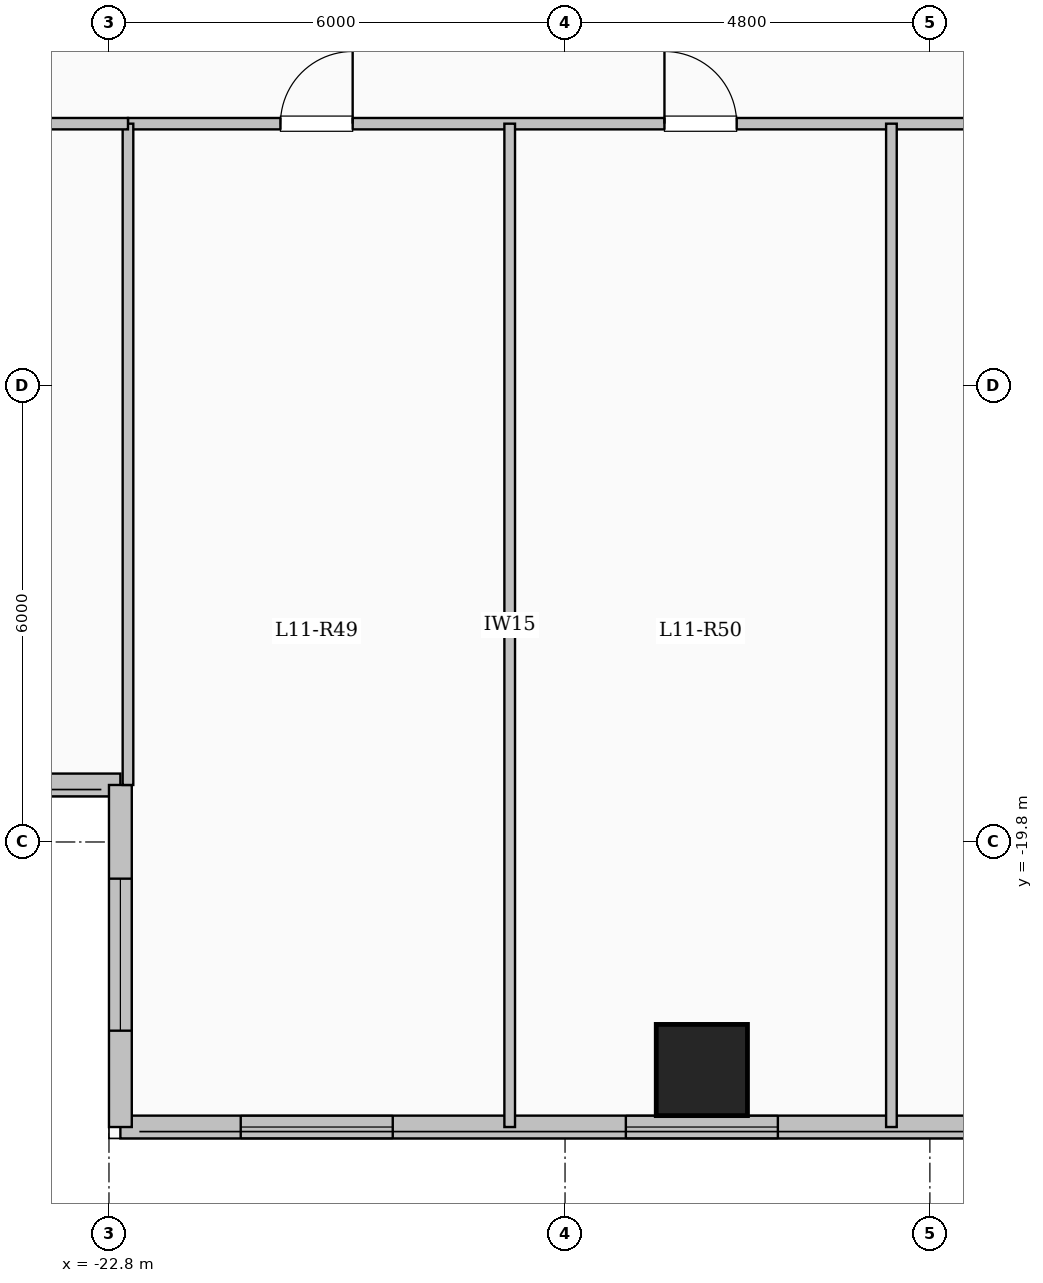
"""IFC4 building model, lengths in metres.
Left out: names, types, materials, properties, quantities, classifications, styles, units other than length and angle.
Written with IfcOpenShell. Run it as: python <this file> out.ifc"""

import sys

from ifc_helpers import new_model, si_unit, direction, frame, frame_2d, origin, origin_2d, place, context, subcontext, project, spatial, rectangle, extrude, element, fill, save


model = new_model("IFC4")
c1 = context("Model", 3, precision=1e-05, world=origin(), true_north=direction((0.0, 1.0)))
c2 = subcontext(c1, "Body", "Model", "MODEL_VIEW")
j1 = project(units=[si_unit("LENGTHUNIT", "METRE"), si_unit("PLANEANGLEUNIT", "RADIAN")], contexts=[c1])
p1 = place(None, origin())
s1 = spatial("IfcSite", under=j1, at=p1, CompositionType="ELEMENT")
p2 = place(p1, origin())
s2 = spatial("IfcBuilding", under=s1, at=p2, CompositionType="ELEMENT")
p3 = place(p2, frame((0.0, 0.0, 44.1)))
s3 = spatial("IfcBuildingStorey", under=s2, at=p3, CompositionType="ELEMENT", Elevation=44.1)
p4 = place(p3, frame((-15.0, -22.8, 0.0), z_axis=(0.0, 0.0, 1.0), x_axis=(1.0, 0.0, 0.0)))
e1 = element("IfcColumn", 1, at=p4, inside=s3, PredefinedType="COLUMN", context=c2, shape_type="SweptSolid", body=[
    extrude(rectangle(XDim=1.2, YDim=1.2, at=origin_2d()), origin(), (0.0, 0.0, 1.0), 3.35),
])
p5 = place(p3, frame((-22.65, -19.05, 0.0), z_axis=(0.0, 0.0, 1.0), x_axis=(-1.0, 0.0, 0.0)))
e2 = element("IfcWall", 2, at=p5, inside=s3, PredefinedType="SOLIDWALL", context=c2, shape_type="SweptSolid", body=[
    extrude(rectangle(XDim=6.0, YDim=0.3, at=frame_2d((3.0, 0.0))), origin(), (0.0, 0.0, 1.0), 3.1),
])
p6 = place(p5, frame((1.775, 0.0, 0.9)))
e3 = element("IfcOpeningElement", 3, at=p6, cuts=e2, PredefinedType="OPENING", context=c2, shape_type="SweptSolid", body=[
    extrude(rectangle(XDim=2.4, YDim=1.8, at=frame_2d((1.2, 0.9))), frame((0.0, 0.16, 0.0), z_axis=(0.0, -1.0, 0.0), x_axis=(1.0, 0.0, 0.0)), (0.0, 0.0, 1.0), 0.32),
])
p7 = place(p3, frame((-7.35, -23.55, 0.0), z_axis=(0.0, 0.0, 1.0), x_axis=(-1.0, 0.0, 0.0)))
e4 = element("IfcWall", 4, at=p7, inside=s3, PredefinedType="SOLIDWALL", context=c2, shape_type="SweptSolid", body=[
    extrude(rectangle(XDim=15.3, YDim=0.3, at=frame_2d((7.65, 0.0))), origin(), (0.0, 0.0, 1.0), 3.1),
])
p8 = place(p7, frame((0.147, 0.0, 0.95)))
e5 = element("IfcOpeningElement", 5, at=p8, cuts=e4, PredefinedType="OPENING", context=c2, shape_type="SweptSolid", body=[
    extrude(rectangle(XDim=0.85, YDim=1.5, at=frame_2d((0.425, 0.75))), frame((0.0, 0.16, 0.0), z_axis=(0.0, -1.0, 0.0), x_axis=(1.0, 0.0, 0.0)), (0.0, 0.0, 1.0), 0.32),
])
p9 = place(p7, frame((2.16, 0.0, 0.9)))
e6 = element("IfcOpeningElement", 6, at=p9, cuts=e4, PredefinedType="OPENING", context=c2, shape_type="SweptSolid", body=[
    extrude(rectangle(XDim=2.0, YDim=1.7, at=frame_2d((1.0, 0.85))), frame((0.0, 0.16, 0.0), z_axis=(0.0, -1.0, 0.0), x_axis=(1.0, 0.0, 0.0)), (0.0, 0.0, 1.0), 0.32),
])
p10 = place(p7, frame((6.65, 0.0, 0.9)))
e7 = element("IfcOpeningElement", 7, at=p10, cuts=e4, PredefinedType="OPENING", context=c2, shape_type="SweptSolid", body=[
    extrude(rectangle(XDim=2.0, YDim=1.7, at=frame_2d((1.0, 0.85))), frame((0.0, 0.16, 0.0), z_axis=(0.0, -1.0, 0.0), x_axis=(1.0, 0.0, 0.0)), (0.0, 0.0, 1.0), 0.32),
])
p11 = place(p7, frame((11.717, 0.0, 0.9)))
e8 = element("IfcOpeningElement", 8, at=p11, cuts=e4, PredefinedType="OPENING", context=c2, shape_type="SweptSolid", body=[
    extrude(rectangle(XDim=2.0, YDim=1.7, at=frame_2d((1.0, 0.85))), frame((0.0, 0.16, 0.0), z_axis=(0.0, -1.0, 0.0), x_axis=(1.0, 0.0, 0.0)), (0.0, 0.0, 1.0), 0.32),
])
p12 = place(p3, frame((-22.65, -23.55, 0.0), z_axis=(0.0, 0.0, 1.0), x_axis=(0.0, 1.0, 0.0)))
e9 = element("IfcWall", 9, at=p12, inside=s3, PredefinedType="SOLIDWALL", context=c2, shape_type="SweptSolid", body=[
    extrude(rectangle(XDim=4.5, YDim=0.3, at=frame_2d((2.25, 0.0))), origin(), (0.0, 0.0, 1.0), 3.1),
])
p13 = place(p12, frame((1.268, 0.0, 0.9)))
e10 = element("IfcOpeningElement", 10, at=p13, cuts=e9, PredefinedType="OPENING", context=c2, shape_type="SweptSolid", body=[
    extrude(rectangle(XDim=2.0, YDim=1.7, at=frame_2d((1.0, 0.85))), frame((0.0, 0.16, 0.0), z_axis=(0.0, -1.0, 0.0), x_axis=(1.0, 0.0, 0.0)), (0.0, 0.0, 1.0), 0.32),
])
p14 = place(p3, frame((-22.55, -10.35, 0.0), z_axis=(0.0, 0.0, 1.0), x_axis=(1.0, 0.0, 0.0)))
e11 = element("IfcWall", 11, at=p14, inside=s3, PredefinedType="PARTITIONING", context=c2, shape_type="SweptSolid", body=[
    extrude(rectangle(XDim=14.0, YDim=0.15, at=frame_2d((7.0, 0.0))), origin(), (0.0, 0.0, 1.0), 3.1),
])
p15 = place(p14, frame((2.006, 0.0, 0.0)))
e12 = element("IfcOpeningElement", 12, at=p15, cuts=e11, PredefinedType="OPENING", context=c2, shape_type="SweptSolid", body=[
    extrude(rectangle(XDim=0.95, YDim=2.15, at=frame_2d((0.475, 1.075))), frame((0.0, 0.085, 0.0), z_axis=(0.0, -1.0, 0.0), x_axis=(1.0, 0.0, 0.0)), (0.0, 0.0, 1.0), 0.17),
])
p16 = place(p14, frame((7.058, 0.0, 0.0)))
e13 = element("IfcOpeningElement", 13, at=p16, cuts=e11, PredefinedType="OPENING", context=c2, shape_type="SweptSolid", body=[
    extrude(rectangle(XDim=0.95, YDim=2.15, at=frame_2d((0.475, 1.075))), frame((0.0, 0.085, 0.0), z_axis=(0.0, -1.0, 0.0), x_axis=(1.0, 0.0, 0.0)), (0.0, 0.0, 1.0), 0.17),
])
p17 = place(p14, frame((11.552, 0.0, 0.0)))
e14 = element("IfcOpeningElement", 14, at=p17, cuts=e11, PredefinedType="OPENING", context=c2, shape_type="SweptSolid", body=[
    extrude(rectangle(XDim=0.95, YDim=2.15, at=frame_2d((0.475, 1.075))), frame((0.0, 0.085, 0.0), z_axis=(0.0, -1.0, 0.0), x_axis=(1.0, 0.0, 0.0)), (0.0, 0.0, 1.0), 0.17),
])
for number, where, z_axis, x_axis in (
    (15, (-17.528, -23.55, 0.0), (0.0, 0.0, 1.0), (0.0, 1.0, 0.0)),
    (16, (-12.506, -23.55, 0.0), (0.0, 0.0, 1.0), (0.0, 1.0, 0.0)),
):
    element("IfcWall", number, at=place(p3, frame(where, z_axis=z_axis, x_axis=x_axis)), inside=s3, PredefinedType="PARTITIONING", context=c2, shape_type="SweptSolid", body=[
        extrude(rectangle(XDim=13.2, YDim=0.14, at=frame_2d((6.6, 0.0))), origin(), (0.0, 0.0, 1.0), 3.1),
    ])
p18 = place(p3, frame((-22.55, -19.05, 0.0), z_axis=(0.0, 0.0, 1.0), x_axis=(0.0, 1.0, 0.0)))
e17 = element("IfcWall", 17, at=p18, inside=s3, PredefinedType="PARTITIONING", context=c2, shape_type="SweptSolid", body=[
    extrude(rectangle(XDim=8.7, YDim=0.14, at=frame_2d((4.35, 0.0))), origin(), (0.0, 0.0, 1.0), 3.1),
])
p19 = place(p3, frame((-28.68, -10.35, 0.0), z_axis=(0.0, 0.0, 1.0), x_axis=(1.0, 0.0, 0.0)))
e18 = element("IfcWall", 18, at=p19, inside=s3, PredefinedType="PARTITIONING", context=c2, shape_type="SweptSolid", body=[
    extrude(rectangle(XDim=6.13, YDim=0.15, at=frame_2d((3.065, 0.0))), origin(), (0.0, 0.0, 1.0), 3.1),
])
p20 = place(p19, frame((2.59, 0.0, 0.0)))
e19 = element("IfcOpeningElement", 19, at=p20, cuts=e18, PredefinedType="OPENING", context=c2, shape_type="SweptSolid", body=[
    extrude(rectangle(XDim=0.95, YDim=2.15, at=frame_2d((0.475, 1.075))), frame((0.0, 0.085, 0.0), z_axis=(0.0, -1.0, 0.0), x_axis=(1.0, 0.0, 0.0)), (0.0, 0.0, 1.0), 0.17),
])
p21 = place(p10, origin())
e20 = element("IfcWindow", 20, at=p21, inside=s3, PartitioningType="SINGLE_PANEL", PredefinedType="WINDOW", context=c2, shape_type="SweptSolid", body=[
    extrude(rectangle(XDim=2.0, YDim=1.7, at=frame_2d((1.0, 0.85))), frame((0.0, 0.03, 0.0), z_axis=(0.0, -1.0, 0.0), x_axis=(1.0, 0.0, 0.0)), (0.0, 0.0, 1.0), 0.06),
])
fill(e7, e20)
p22 = place(p11, origin())
e21 = element("IfcWindow", 21, at=p22, inside=s3, PartitioningType="SINGLE_PANEL", PredefinedType="WINDOW", context=c2, shape_type="SweptSolid", body=[
    extrude(rectangle(XDim=2.0, YDim=1.7, at=frame_2d((1.0, 0.85))), frame((0.0, 0.03, 0.0), z_axis=(0.0, -1.0, 0.0), x_axis=(1.0, 0.0, 0.0)), (0.0, 0.0, 1.0), 0.06),
])
fill(e8, e21)
p23 = place(p13, origin())
e22 = element("IfcWindow", 22, at=p23, inside=s3, PartitioningType="SINGLE_PANEL", PredefinedType="WINDOW", context=c2, shape_type="SweptSolid", body=[
    extrude(rectangle(XDim=2.0, YDim=1.7, at=frame_2d((1.0, 0.85))), frame((0.0, 0.03, 0.0), z_axis=(0.0, -1.0, 0.0), x_axis=(1.0, 0.0, 0.0)), (0.0, 0.0, 1.0), 0.06),
])
fill(e10, e22)
p24 = place(p15, origin())
e23 = element("IfcDoor", 23, at=p24, inside=s3, OperationType="SINGLE_SWING_RIGHT", PredefinedType="DOOR", context=c2, shape_type="SweptSolid", body=[
    extrude(rectangle(XDim=0.95, YDim=2.15, at=frame_2d((0.475, 1.075))), frame((0.0, 0.025, 0.0), z_axis=(0.0, -1.0, 0.0), x_axis=(1.0, 0.0, 0.0)), (0.0, 0.0, 1.0), 0.05),
])
fill(e12, e23)
p25 = place(p16, origin())
e24 = element("IfcDoor", 24, at=p25, inside=s3, OperationType="SINGLE_SWING_LEFT", PredefinedType="DOOR", context=c2, shape_type="SweptSolid", body=[
    extrude(rectangle(XDim=0.95, YDim=2.15, at=frame_2d((0.475, 1.075))), frame((0.0, 0.025, 0.0), z_axis=(0.0, -1.0, 0.0), x_axis=(1.0, 0.0, 0.0)), (0.0, 0.0, 1.0), 0.05),
])
fill(e13, e24)
save(model, sys.argv[1])
